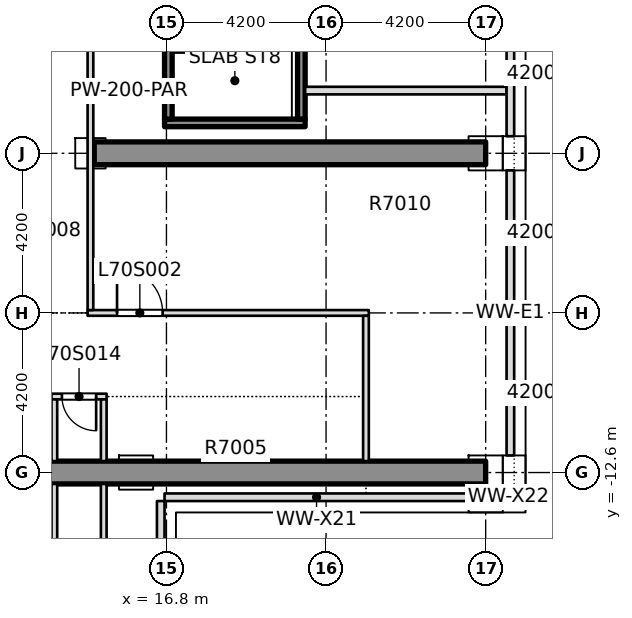
"""IFC4 building model, lengths in metres.
Left out: names, types, materials, properties, quantities, classifications, styles, units other than length and angle.
Written with IfcOpenShell. Run it as: python <this file> out.ifc"""

import sys

from ifc_helpers import new_model, si_unit, direction, frame, frame_2d, origin, place, context, subcontext, project, spatial, rectangle, extrude, element, fill, save


model = new_model("IFC4")
c1 = context("Model", 3, precision=1e-05, world=origin(), true_north=direction((0.0, 1.0)))
c2 = subcontext(c1, "Body", "Model", "MODEL_VIEW")
j1 = project(units=[si_unit("LENGTHUNIT", "METRE"), si_unit("PLANEANGLEUNIT", "RADIAN")], contexts=[c1])
p1 = place(None, origin())
s1 = spatial("IfcSite", under=j1, at=p1, CompositionType="ELEMENT")
p2 = place(p1, origin())
s2 = spatial("IfcBuilding", under=s1, at=p2, CompositionType="ELEMENT")
p3 = place(p2, frame((0.0, 0.0, 264.85)))
s3 = spatial("IfcBuildingStorey", under=s2, at=p3, CompositionType="ELEMENT", Elevation=264.85)
p4 = place(p3, frame((8.55, -12.6, 0.0), z_axis=(0.0, 0.0, 1.0), x_axis=(1.0, 0.0, 0.0)))
e1 = element("IfcWall", 1, at=p4, inside=s3, PredefinedType="SHEAR", context=c2, shape_type="SweptSolid", body=[
    extrude(rectangle(XDim=16.65, YDim=0.6, at=frame_2d((8.325, 0.0))), origin(), (0.0, 0.0, 1.0), 4.0),
])
p5 = place(p3, frame((14.9, -4.2, 0.0), z_axis=(0.0, 0.0, 1.0), x_axis=(1.0, 0.0, 0.0)))
e2 = element("IfcWall", 2, at=p5, inside=s3, PredefinedType="SHEAR", context=c2, shape_type="SweptSolid", body=[
    extrude(rectangle(XDim=10.3, YDim=0.6, at=frame_2d((5.15, 0.0))), origin(), (0.0, 0.0, 1.0), 4.0),
])
p6 = place(p3, frame((13.775, -10.6, 0.0), z_axis=(0.0, 0.0, 1.0), x_axis=(1.0, 0.0, 0.0)))
e3 = element("IfcWall", 3, at=p6, inside=s3, PredefinedType="PARTITIONING", context=c2, shape_type="SweptSolid", body=[
    extrude(rectangle(XDim=1.45, YDim=0.15, at=frame_2d((0.725, 0.0))), origin(), (0.0, 0.0, 1.0), 4.0),
])
p7 = place(p6, frame((0.275, 0.0, 0.0)))
e4 = element("IfcOpeningElement", 4, at=p7, cuts=e3, PredefinedType="OPENING", context=c2, shape_type="SweptSolid", body=[
    extrude(rectangle(XDim=0.9, YDim=2.1, at=frame_2d((0.45, 1.05))), frame((0.0, 0.085, 0.0), z_axis=(0.0, -1.0, 0.0), x_axis=(1.0, 0.0, 0.0)), (0.0, 0.0, 1.0), 0.17),
])
p8 = place(p3, frame((14.725, -8.4, 0.0), z_axis=(0.0, 0.0, 1.0), x_axis=(1.0, 0.0, 0.0)))
e5 = element("IfcWall", 5, at=p8, inside=s3, PredefinedType="PARTITIONING", context=c2, shape_type="SweptSolid", body=[
    extrude(rectangle(XDim=7.4, YDim=0.15, at=frame_2d((3.7, 0.0))), origin(), (0.0, 0.0, 1.0), 4.0),
])
p9 = place(p8, frame((0.775, 0.0, 0.0)))
e6 = element("IfcOpeningElement", 6, at=p9, cuts=e5, PredefinedType="OPENING", context=c2, shape_type="SweptSolid", body=[
    extrude(rectangle(XDim=1.2, YDim=2.1, at=frame_2d((0.6, 1.05))), frame((0.0, 0.085, 0.0), z_axis=(0.0, -1.0, 0.0), x_axis=(1.0, 0.0, 0.0)), (0.0, 0.0, 1.0), 0.17),
])
p10 = place(p3, frame((14.875, -2.55, 0.0), z_axis=(0.0, 0.0, 1.0), x_axis=(1.0, 0.0, 0.0)))
e7 = element("IfcWall", 7, at=p10, inside=s3, PredefinedType="PARTITIONING", context=c2, shape_type="SweptSolid", body=[
    extrude(rectangle(XDim=1.875, YDim=0.2, at=frame_2d((0.938, 0.0))), origin(), (0.0, 0.0, 1.0), 4.0),
])
p11 = place(p3, frame((20.45, -2.55, 0.0), z_axis=(0.0, 0.0, 1.0), x_axis=(1.0, 0.0, 0.0)))
e8 = element("IfcWall", 8, at=p11, inside=s3, PredefinedType="PARTITIONING", context=c2, shape_type="SweptSolid", body=[
    extrude(rectangle(XDim=5.3, YDim=0.2, at=frame_2d((2.65, 0.0))), origin(), (0.0, 0.0, 1.0), 4.0),
])
p12 = place(p3, frame((13.85, -21.55, 0.0), z_axis=(0.0, 0.0, 1.0), x_axis=(0.0, 1.0, 0.0)))
e9 = element("IfcWall", 9, at=p12, inside=s3, PredefinedType="PARTITIONING", context=c2, shape_type="SweptSolid", body=[
    extrude(rectangle(XDim=8.649, YDim=0.15, at=frame_2d((4.325, 0.0))), origin(), (0.0, 0.0, 1.0), 4.0),
])
p13 = place(p3, frame((13.85, -12.299, 0.0), z_axis=(0.0, 0.0, 1.0), x_axis=(0.0, 1.0, 0.0)))
e10 = element("IfcWall", 10, at=p13, inside=s3, PredefinedType="PARTITIONING", context=c2, shape_type="SweptSolid", body=[
    extrude(rectangle(XDim=1.624, YDim=0.15, at=frame_2d((0.812, 0.0))), origin(), (0.0, 0.0, 1.0), 4.0),
])
p14 = place(p3, frame((14.8, -8.325, 0.0), z_axis=(0.0, 0.0, 1.0), x_axis=(0.0, 1.0, 0.0)))
e11 = element("IfcWall", 11, at=p14, inside=s3, PredefinedType="PARTITIONING", context=c2, shape_type="SweptSolid", body=[
    extrude(rectangle(XDim=29.875, YDim=0.15, at=frame_2d((14.938, 0.0))), origin(), (0.0, 0.0, 1.0), 4.0),
])
p15 = place(p14, frame((8.892, 0.0, 0.0)))
e12 = element("IfcOpeningElement", 12, at=p15, cuts=e11, PredefinedType="OPENING", context=c2, shape_type="SweptSolid", body=[
    extrude(rectangle(XDim=1.2, YDim=2.1, at=frame_2d((0.6, 1.05))), frame((0.0, 0.085, 0.0), z_axis=(0.0, -1.0, 0.0), x_axis=(1.0, 0.0, 0.0)), (0.0, 0.0, 1.0), 0.17),
])
p16 = place(p14, frame((14.129, 0.0, 0.0)))
e13 = element("IfcOpeningElement", 13, at=p16, cuts=e11, PredefinedType="OPENING", context=c2, shape_type="SweptSolid", body=[
    extrude(rectangle(XDim=0.9, YDim=2.1, at=frame_2d((0.45, 1.05))), frame((0.0, 0.085, 0.0), z_axis=(0.0, -1.0, 0.0), x_axis=(1.0, 0.0, 0.0)), (0.0, 0.0, 1.0), 0.17),
])
p17 = place(p14, frame((17.162, 0.0, 0.0)))
e14 = element("IfcOpeningElement", 14, at=p17, cuts=e11, PredefinedType="OPENING", context=c2, shape_type="SweptSolid", body=[
    extrude(rectangle(XDim=0.9, YDim=2.1, at=frame_2d((0.45, 1.05))), frame((0.0, 0.085, 0.0), z_axis=(0.0, -1.0, 0.0), x_axis=(1.0, 0.0, 0.0)), (0.0, 0.0, 1.0), 0.17),
])
p18 = place(p14, frame((19.375, 0.0, 0.0)))
e15 = element("IfcOpeningElement", 15, at=p18, cuts=e11, PredefinedType="OPENING", context=c2, shape_type="SweptSolid", body=[
    extrude(rectangle(XDim=1.2, YDim=2.1, at=frame_2d((0.6, 1.05))), frame((0.0, 0.085, 0.0), z_axis=(0.0, -1.0, 0.0), x_axis=(1.0, 0.0, 0.0)), (0.0, 0.0, 1.0), 0.17),
])
p19 = place(p14, frame((25.325, 0.0, 0.0)))
e16 = element("IfcOpeningElement", 16, at=p19, cuts=e11, PredefinedType="OPENING", context=c2, shape_type="SweptSolid", body=[
    extrude(rectangle(XDim=0.9, YDim=2.1, at=frame_2d((0.45, 1.05))), frame((0.0, 0.085, 0.0), z_axis=(0.0, -1.0, 0.0), x_axis=(1.0, 0.0, 0.0)), (0.0, 0.0, 1.0), 0.17),
])
p20 = place(p3, frame((15.15, -21.55, 0.0), z_axis=(0.0, 0.0, 1.0), x_axis=(0.0, 1.0, 0.0)))
e17 = element("IfcWall", 17, at=p20, inside=s3, PredefinedType="PARTITIONING", context=c2, shape_type="SweptSolid", body=[
    extrude(rectangle(XDim=8.649, YDim=0.15, at=frame_2d((4.325, 0.0))), origin(), (0.0, 0.0, 1.0), 4.0),
])
p21 = place(p3, frame((15.15, -12.299, 0.0), z_axis=(0.0, 0.0, 1.0), x_axis=(0.0, 1.0, 0.0)))
e18 = element("IfcWall", 18, at=p21, inside=s3, PredefinedType="PARTITIONING", context=c2, shape_type="SweptSolid", body=[
    extrude(rectangle(XDim=1.624, YDim=0.15, at=frame_2d((0.812, 0.0))), origin(), (0.0, 0.0, 1.0), 4.0),
])
p22 = place(p3, frame((22.05, -12.299, 0.0), z_axis=(0.0, 0.0, 1.0), x_axis=(0.0, 1.0, 0.0)))
e19 = element("IfcWall", 19, at=p22, inside=s3, PredefinedType="PARTITIONING", context=c2, shape_type="SweptSolid", body=[
    extrude(rectangle(XDim=3.824, YDim=0.15, at=frame_2d((1.912, 0.0))), origin(), (0.0, 0.0, 1.0), 4.0),
])
p23 = place(p3, frame((16.65, -20.55, 0.0), z_axis=(0.0, 0.0, 1.0), x_axis=(0.0, 1.0, 0.0)))
e20 = element("IfcWall", 20, at=p23, inside=s3, PredefinedType="STANDARD", context=c2, shape_type="SweptSolid", body=[
    extrude(rectangle(XDim=7.2, YDim=0.2, at=frame_2d((3.6, 0.0))), origin(), (0.0, 0.0, 1.0), 4.0),
])
p24 = place(p3, frame((16.75, -13.25, 0.0), z_axis=(0.0, 0.0, 1.0), x_axis=(1.0, 0.0, 0.0)))
e21 = element("IfcWall", 21, at=p24, inside=s3, PredefinedType="STANDARD", context=c2, shape_type="SweptSolid", body=[
    extrude(rectangle(XDim=8.0, YDim=0.2, at=frame_2d((4.0, 0.0))), origin(), (0.0, 0.0, 1.0), 4.0),
])
p25 = place(p3, frame((25.65, -13.25, 0.0), z_axis=(0.0, 0.0, 1.0), x_axis=(1.0, 0.0, 0.0)))
e22 = element("IfcWall", 22, at=p25, inside=s3, PredefinedType="STANDARD", context=c2, shape_type="SweptSolid", body=[
    extrude(rectangle(XDim=0.3, YDim=0.2, at=frame_2d((0.15, 0.0))), origin(), (0.0, 0.0, 1.0), 4.0),
])
for number, where, z_axis, x_axis in (
    (23, (25.85, -12.15, 0.0), (0.0, 0.0, 1.0), (0.0, 1.0, 0.0)),
    (24, (25.85, -3.75, 0.0), (0.0, 0.0, 1.0), (0.0, 1.0, 0.0)),
):
    element("IfcWall", number, at=place(p3, frame(where, z_axis=z_axis, x_axis=x_axis)), inside=s3, PredefinedType="STANDARD", context=c2, shape_type="SweptSolid", body=[
        extrude(rectangle(XDim=7.5, YDim=0.2, at=frame_2d((3.75, 0.0))), origin(), (0.0, 0.0, 1.0), 4.0),
    ])
p26 = place(p3, frame((16.75, -3.4, 0.0), z_axis=(0.0, 0.0, 1.0), x_axis=(1.0, 0.0, 0.0)))
e25 = element("IfcWall", 25, at=p26, inside=s3, PredefinedType="SOLIDWALL", context=c2, shape_type="SweptSolid", body=[
    extrude(rectangle(XDim=3.7, YDim=0.2, at=frame_2d((1.85, 0.0))), origin(), (0.0, 0.0, 1.0), 4.0),
])
for number, where, z_axis, x_axis in (
    (26, (16.85, -3.3, 0.0), (0.0, 0.0, 1.0), (0.0, 1.0, 0.0)),
    (27, (20.35, -3.3, 0.0), (0.0, 0.0, 1.0), (0.0, 1.0, 0.0)),
):
    element("IfcWall", number, at=place(p3, frame(where, z_axis=z_axis, x_axis=x_axis)), inside=s3, PredefinedType="SOLIDWALL", context=c2, shape_type="SweptSolid", body=[
        extrude(rectangle(XDim=6.6, YDim=0.2, at=frame_2d((3.3, 0.0))), origin(), (0.0, 0.0, 1.0), 4.0),
    ])
p27 = place(p9, origin())
e28 = element("IfcDoor", 28, at=p27, inside=s3, OperationType="SINGLE_SWING_LEFT", PredefinedType="DOOR", context=c2, shape_type="SweptSolid", body=[
    extrude(rectangle(XDim=1.2, YDim=2.1, at=frame_2d((0.6, 1.05))), frame((0.0, 0.025, 0.0), z_axis=(0.0, -1.0, 0.0), x_axis=(1.0, 0.0, 0.0)), (0.0, 0.0, 1.0), 0.05),
])
fill(e6, e28)
p28 = place(p7, origin())
e29 = element("IfcDoor", 29, at=p28, inside=s3, OperationType="SINGLE_SWING_RIGHT", PredefinedType="DOOR", context=c2, shape_type="SweptSolid", body=[
    extrude(rectangle(XDim=0.9, YDim=2.1, at=frame_2d((0.45, 1.05))), frame((0.0, 0.025, 0.0), z_axis=(0.0, -1.0, 0.0), x_axis=(1.0, 0.0, 0.0)), (0.0, 0.0, 1.0), 0.05),
])
fill(e4, e29)
save(model, sys.argv[1])
